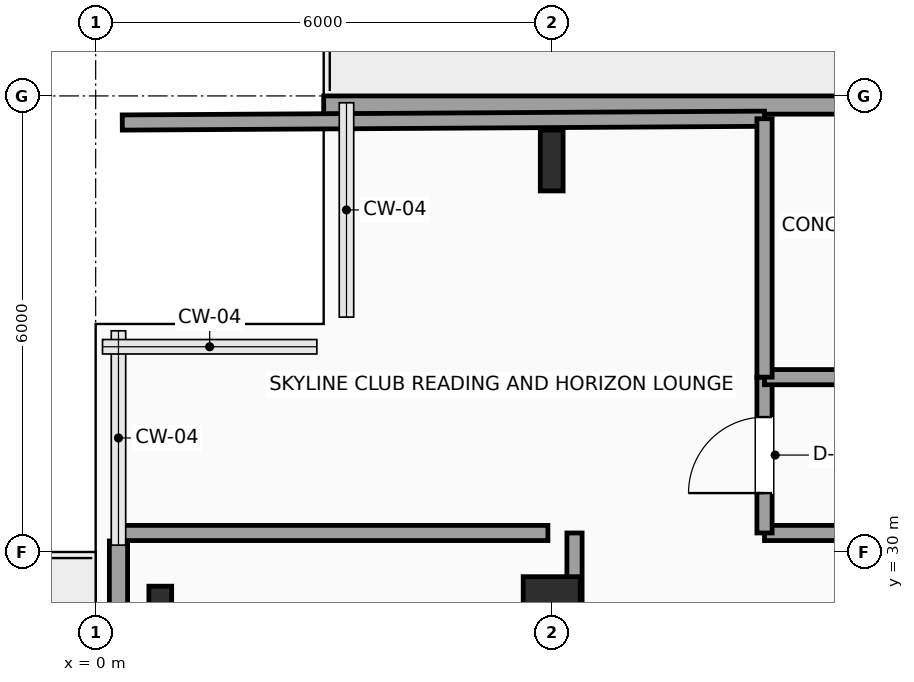
"""IFC4 building model, lengths in metres.
Left out: names, types, materials, properties, quantities, classifications, styles, units other than length and angle.
Written with IfcOpenShell. Run it as: python <this file> out.ifc"""

import sys

from ifc_helpers import new_model, si_unit, direction, frame, frame_2d, origin, origin_2d, place, context, subcontext, project, spatial, rectangle, i_section, extrude, element, fill, save


model = new_model("IFC4")
c1 = context("Model", 3, precision=1e-05, world=origin(), true_north=direction((0.0, 1.0)))
c2 = subcontext(c1, "Body", "Model", "MODEL_VIEW")
j1 = project(units=[si_unit("LENGTHUNIT", "METRE"), si_unit("PLANEANGLEUNIT", "RADIAN")], contexts=[c1])
p1 = place(None, origin())
s1 = spatial("IfcSite", under=j1, at=p1, CompositionType="ELEMENT")
p2 = place(p1, origin())
s2 = spatial("IfcBuilding", under=s1, at=p2, CompositionType="ELEMENT")
p3 = place(p2, frame((0.0, 0.0, 169.2)))
s3 = spatial("IfcBuildingStorey", under=s2, at=p3, CompositionType="ELEMENT", Elevation=169.2)
p4 = place(p3, frame((0.85, 29.15, 0.0), z_axis=(0.0, 0.0, 1.0), x_axis=(1.0, 0.0, 0.0)))
e1 = element("IfcColumn", 1, at=p4, inside=s3, PredefinedType="COLUMN", context=c2, shape_type="SweptSolid", body=[
    extrude(i_section(OverallWidth=0.3, OverallDepth=0.8, WebThickness=0.018, FlangeThickness=0.033, FilletRadius=0.03, at=origin_2d()), origin(), (0.0, 0.0, 1.0), 3.75),
])
p5 = place(p3, frame((6.0, 29.15, 0.0), z_axis=(0.0, 0.0, 1.0), x_axis=(1.0, 0.0, 0.0)))
e2 = element("IfcColumn", 2, at=p5, inside=s3, PredefinedType="COLUMN", context=c2, shape_type="SweptSolid", body=[
    extrude(rectangle(XDim=0.75, YDim=1.05, at=origin_2d()), origin(), (0.0, 0.0, 1.0), 3.75),
])
p6 = place(p3, frame((6.0, 35.15, 0.0), z_axis=(0.0, 0.0, 1.0), x_axis=(1.0, 0.0, 0.0)))
e3 = element("IfcColumn", 3, at=p6, inside=s3, PredefinedType="COLUMN", context=c2, shape_type="SweptSolid", body=[
    extrude(i_section(OverallWidth=0.3, OverallDepth=0.8, WebThickness=0.018, FlangeThickness=0.033, FilletRadius=0.03, at=origin_2d()), origin(), (0.0, 0.0, 1.0), 3.75),
])
p7 = place(p3, frame((0.3, 20.855, 0.0), z_axis=(0.0, 0.0, 1.0), x_axis=(0.0, 1.0, 0.0)))
e4 = element("IfcWall", 4, at=p7, inside=s3, PredefinedType="SOLIDWALL", context=c2, shape_type="SweptSolid", body=[
    extrude(rectangle(XDim=9.29, YDim=0.24, at=frame_2d((4.645, 0.0))), origin(), (0.0, 0.0, 1.0), 3.54),
])
p8 = place(p7, frame((3.945, 0.0, 0.0)))
e5 = element("IfcOpeningElement", 5, at=p8, cuts=e4, PredefinedType="OPENING", context=c2, shape_type="SweptSolid", body=[
    extrude(rectangle(XDim=1.05, YDim=2.2, at=frame_2d((0.525, 1.1))), frame((0.0, 0.13, 0.0), z_axis=(0.0, -1.0, 0.0), x_axis=(1.0, 0.0, 0.0)), (0.0, 0.0, 1.0), 0.26),
])
p9 = place(p7, frame((5.345, 0.0, 0.85)))
e6 = element("IfcOpeningElement", 6, at=p9, cuts=e4, PredefinedType="OPENING", context=c2, shape_type="SweptSolid", body=[
    extrude(rectangle(XDim=2.1, YDim=2.2, at=frame_2d((1.05, 1.1))), frame((0.0, 0.13, 0.0), z_axis=(0.0, -1.0, 0.0), x_axis=(1.0, 0.0, 0.0)), (0.0, 0.0, 1.0), 0.26),
])
p10 = place(p3, frame((3.0, 35.88, 0.0), z_axis=(0.0, 0.0, 1.0), x_axis=(1.0, 0.0, 0.0)))
e7 = element("IfcWall", 7, at=p10, inside=s3, PredefinedType="SOLIDWALL", context=c2, shape_type="SweptSolid", body=[
    extrude(rectangle(XDim=18.0, YDim=0.24, at=frame_2d((9.0, 0.0))), origin(), (0.0, 0.0, 1.0), 3.54),
])
p11 = place(p10, frame((9.7, 0.0, 0.0)))
e8 = element("IfcOpeningElement", 8, at=p11, cuts=e7, PredefinedType="OPENING", context=c2, shape_type="SweptSolid", body=[
    extrude(rectangle(XDim=1.8, YDim=2.4, at=frame_2d((0.9, 1.2))), frame((0.0, 0.13, 0.0), z_axis=(0.0, -1.0, 0.0), x_axis=(1.0, 0.0, 0.0)), (0.0, 0.0, 1.0), 0.26),
])
p12 = place(p3, frame((15.88, 30.25, 0.0), z_axis=(0.0, 0.0, 1.0), x_axis=(-1.0, 0.0, 0.0)))
e9 = element("IfcWall", 9, at=p12, inside=s3, PredefinedType="PARTITIONING", context=c2, shape_type="SweptSolid", body=[
    extrude(rectangle(XDim=7.08, YDim=0.2, at=frame_2d((3.54, 0.0))), origin(), (0.0, 0.0, 1.0), 3.54),
])
p13 = place(p12, frame((2.21, 0.0, 0.0)))
e10 = element("IfcOpeningElement", 10, at=p13, cuts=e9, PredefinedType="OPENING", context=c2, shape_type="SweptSolid", body=[
    extrude(rectangle(XDim=1.0, YDim=2.2, at=frame_2d((0.5, 1.1))), frame((0.0, 0.11, 0.0), z_axis=(0.0, -1.0, 0.0), x_axis=(1.0, 0.0, 0.0)), (0.0, 0.0, 1.0), 0.22),
])
p14 = place(p3, frame((8.8, 30.25, 0.0), z_axis=(0.0, 0.0, 1.0), x_axis=(0.0, 1.0, 0.0)))
e11 = element("IfcWall", 11, at=p14, inside=s3, PredefinedType="PARTITIONING", context=c2, shape_type="SweptSolid", body=[
    extrude(rectangle(XDim=2.05, YDim=0.2, at=frame_2d((1.025, 0.0))), origin(), (0.0, 0.0, 1.0), 3.54),
])
p15 = place(p14, frame((0.525, 0.0, 0.0)))
e12 = element("IfcOpeningElement", 12, at=p15, cuts=e11, PredefinedType="OPENING", context=c2, shape_type="SweptSolid", body=[
    extrude(rectangle(XDim=1.0, YDim=2.2, at=frame_2d((0.5, 1.1))), frame((0.0, 0.11, 0.0), z_axis=(0.0, -1.0, 0.0), x_axis=(1.0, 0.0, 0.0)), (0.0, 0.0, 1.0), 0.22),
])
p16 = place(p3, frame((8.8, 32.3, 0.0), z_axis=(0.0, 0.0, 1.0), x_axis=(1.0, 0.0, 0.0)))
e13 = element("IfcWall", 13, at=p16, inside=s3, PredefinedType="PARTITIONING", context=c2, shape_type="SweptSolid", body=[
    extrude(rectangle(XDim=6.2, YDim=0.2, at=frame_2d((3.1, 0.0))), origin(), (0.0, 0.0, 1.0), 3.132),
])
p17 = place(p16, frame((2.6, 0.0, 0.0)))
e14 = element("IfcOpeningElement", 14, at=p17, cuts=e13, PredefinedType="OPENING", context=c2, shape_type="SweptSolid", body=[
    extrude(rectangle(XDim=1.0, YDim=2.2, at=frame_2d((0.5, 1.1))), frame((0.0, 0.11, 0.0), z_axis=(0.0, -1.0, 0.0), x_axis=(1.0, 0.0, 0.0)), (0.0, 0.0, 1.0), 0.22),
])
p18 = place(p3, frame((0.3, 30.25, 0.0), z_axis=(0.0, 0.0, 1.0), x_axis=(1.0, 0.0, 0.0)))
e15 = element("IfcWall", 15, at=p18, inside=s3, PredefinedType="PARTITIONING", context=c2, shape_type="SweptSolid", body=[
    extrude(rectangle(XDim=5.65, YDim=0.2, at=frame_2d((2.825, 0.0))), origin(), (0.0, 0.0, 1.0), 3.54),
])
p19 = place(p3, frame((6.3, 27.65, 0.0), z_axis=(0.0, 0.0, 1.0), x_axis=(0.0, 1.0, 0.0)))
e16 = element("IfcWall", 16, at=p19, inside=s3, PredefinedType="PARTITIONING", context=c2, shape_type="SweptSolid", body=[
    extrude(rectangle(XDim=2.6, YDim=0.2, at=frame_2d((1.3, 0.0))), origin(), (0.0, 0.0, 1.0), 3.132),
])
p20 = place(p3, frame((0.35, 35.65, 0.0), z_axis=(0.0, 0.0, 1.0), x_axis=(0.99998245966, 0.005922868574, 0.0)))
e17 = element("IfcWall", 17, at=p20, inside=s3, PredefinedType="PARTITIONING", context=c2, shape_type="SweptSolid", body=[
    extrude(rectangle(XDim=8.45, YDim=0.2, at=frame_2d((4.225, 0.0))), origin(), (0.0, 0.0, 1.0), 3.54),
])
p21 = place(p3, frame((8.8, 32.3, 0.0), z_axis=(0.0, 0.0, 1.0), x_axis=(0.0, 1.0, 0.0)))
e18 = element("IfcWall", 18, at=p21, inside=s3, PredefinedType="PARTITIONING", context=c2, shape_type="SweptSolid", body=[
    extrude(rectangle(XDim=3.4, YDim=0.2, at=frame_2d((1.7, 0.0))), origin(), (0.0, 0.0, 1.0), 3.54),
])
p22 = place(p15, origin())
e19 = element("IfcDoor", 19, at=p22, inside=s3, OperationType="SINGLE_SWING_LEFT", PredefinedType="DOOR", context=c2, shape_type="SweptSolid", body=[
    extrude(rectangle(XDim=1.0, YDim=2.2, at=frame_2d((0.5, 1.1))), frame((0.0, 0.025, 0.0), z_axis=(0.0, -1.0, 0.0), x_axis=(1.0, 0.0, 0.0)), (0.0, 0.0, 1.0), 0.05),
])
fill(e12, e19)
save(model, sys.argv[1])
